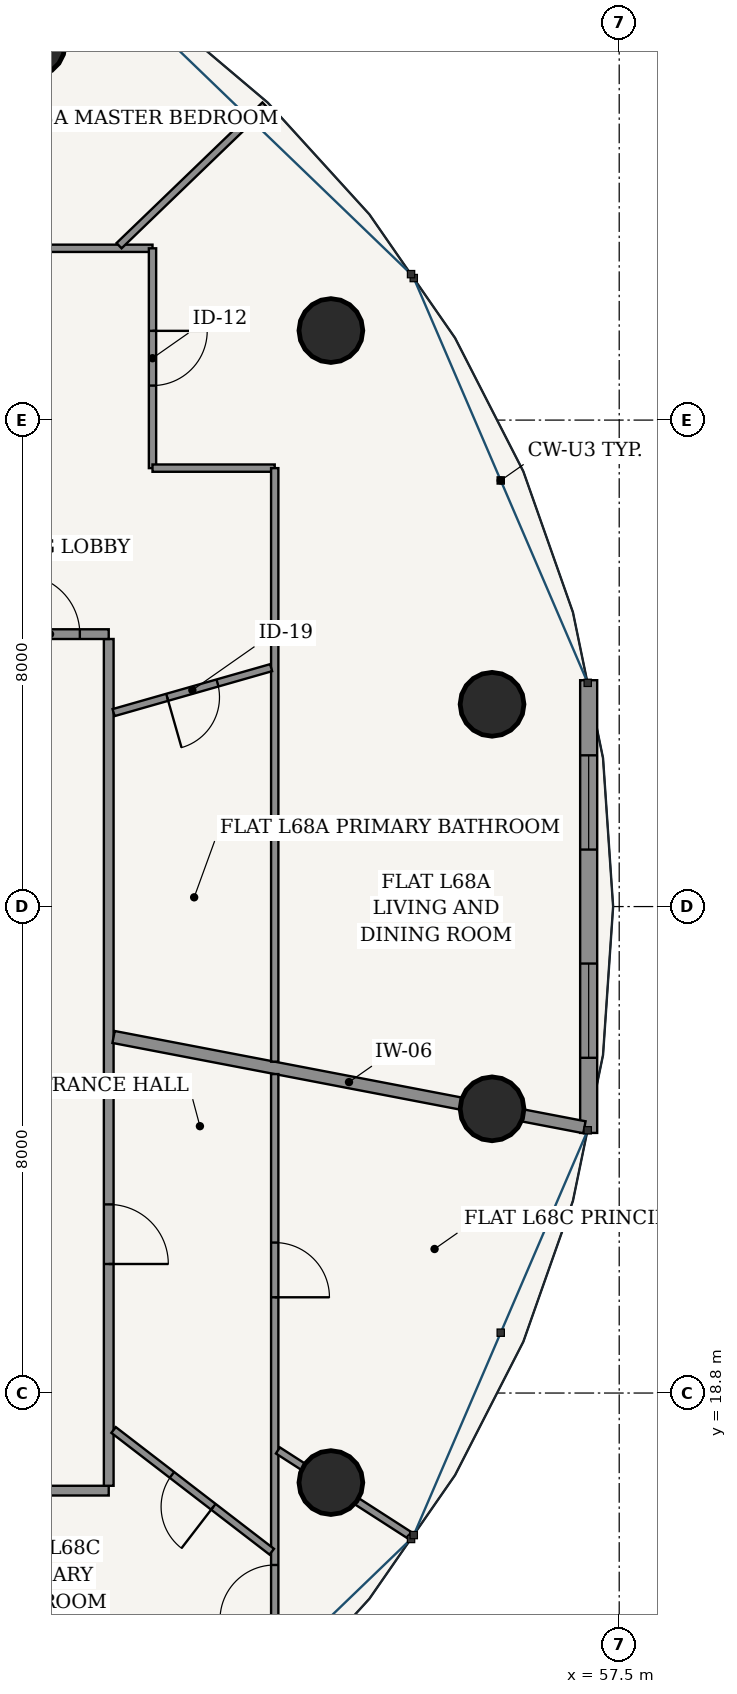
"""IFC4 building model, lengths in metres.
Left out: names, types, materials, properties, quantities, classifications, styles, units other than length and angle.
Written with IfcOpenShell. Run it as: python <this file> out.ifc"""

import sys

from ifc_helpers import new_model, si_unit, direction, frame, frame_2d, origin, origin_2d, place, context, subcontext, project, spatial, rectangle, hollow_circle, extrude, source, transform, mapped, element, fill, save


model = new_model("IFC4")
c1 = context("Model", 3, precision=1e-05, world=origin(), true_north=direction((-0.2419218956, 0.970295726276)))
c2 = subcontext(c1, "Body", "Model", "MODEL_VIEW")
j1 = project(units=[si_unit("LENGTHUNIT", "METRE"), si_unit("PLANEANGLEUNIT", "RADIAN")], contexts=[c1])
p1 = place(None, origin())
s1 = spatial("IfcSite", under=j1, at=p1, CompositionType="ELEMENT")
p2 = place(p1, origin())
s2 = spatial("IfcBuilding", under=s1, at=p2, CompositionType="ELEMENT")
p3 = place(p2, frame((0.0, 0.0, 259.45)))
s3 = spatial("IfcBuildingStorey", under=s2, at=p3, CompositionType="ELEMENT", Elevation=259.45)
for number, where, z_axis, x_axis in (
    (1, (55.409, 30.126, 0.0), (0.0, 0.0, 1.0), (1.0, 0.0, 0.0)),
    (2, (52.759, 36.272, 0.0), (0.0, 0.0, 1.0), (1.0, 0.0, 0.0)),
    (3, (47.861, 40.977, 0.0), (0.0, 0.0, 1.0), (1.0, 0.0, 0.0)),
    (4, (52.759, 17.328, 0.0), (0.0, 0.0, 1.0), (1.0, 0.0, 0.0)),
    (5, (55.409, 23.474, 0.0), (0.0, 0.0, 1.0), (1.0, 0.0, 0.0)),
):
    element("IfcColumn", number, at=place(p3, frame(where, z_axis=z_axis, x_axis=x_axis)), inside=s3, PredefinedType="COLUMN", context=c2, shape_type="SweptSolid", body=[
        extrude(hollow_circle(Radius=0.525, WallThickness=0.035, at=origin_2d()), origin(), (0.0, 0.0, 1.0), 3.75),
    ])
p4 = place(p3, frame((56.998, 23.078, 0.0), z_axis=(0.0, 0.0, 1.0), x_axis=(0.0, 1.0, 0.0)))
e6 = element("IfcWall", 6, at=p4, inside=s3, PredefinedType="SOLIDWALL", context=c2, shape_type="SweptSolid", body=[
    extrude(rectangle(XDim=7.445, YDim=0.28, at=frame_2d((3.722, 0.0))), origin(), (0.0, 0.0, 1.0), 3.49),
])
p5 = place(p4, frame((1.235, 0.0, 0.85)))
e7 = element("IfcOpeningElement", 7, at=p5, cuts=e6, PredefinedType="OPENING", context=c2, shape_type="SweptSolid", body=[
    extrude(rectangle(XDim=1.55, YDim=1.95, at=frame_2d((0.775, 0.975))), frame((0.0, 0.15, 0.0), z_axis=(0.0, -1.0, 0.0), x_axis=(1.0, 0.0, 0.0)), (0.0, 0.0, 1.0), 0.3),
])
p6 = place(p4, frame((4.66, 0.0, 0.85)))
e8 = element("IfcOpeningElement", 8, at=p6, cuts=e6, PredefinedType="OPENING", context=c2, shape_type="SweptSolid", body=[
    extrude(rectangle(XDim=1.55, YDim=1.95, at=frame_2d((0.775, 0.975))), frame((0.0, 0.15, 0.0), z_axis=(0.0, -1.0, 0.0), x_axis=(1.0, 0.0, 0.0)), (0.0, 0.0, 1.0), 0.3),
])
p7 = place(p3, frame((26.895, 17.195, 0.0), z_axis=(0.0, 0.0, 1.0), x_axis=(1.0, 0.0, 0.0)))
e9 = element("IfcWall", 9, at=p7, inside=s3, PredefinedType="PARTITIONING", context=c2, shape_type="SweptSolid", body=[
    extrude(rectangle(XDim=22.21, YDim=0.16, at=frame_2d((11.105, 0.0))), origin(), (0.0, 0.0, 1.0), 3.015),
])
p8 = place(p3, frame((49.105, 17.275, 0.0), z_axis=(0.0, 0.0, 1.0), x_axis=(0.0, 1.0, 0.0)))
e10 = element("IfcWall", 10, at=p8, inside=s3, PredefinedType="PARTITIONING", context=c2, shape_type="SweptSolid", body=[
    extrude(rectangle(XDim=13.925, YDim=0.16, at=frame_2d((6.962, 0.0))), origin(), (0.0, 0.0, 1.0), 3.015),
])
p9 = place(p8, frame((3.647, 0.0, 0.0)))
e11 = element("IfcOpeningElement", 11, at=p9, cuts=e10, PredefinedType="OPENING", context=c2, shape_type="SweptSolid", body=[
    extrude(rectangle(XDim=0.98, YDim=2.2, at=frame_2d((0.49, 1.1))), frame((0.0, 0.09, 0.0), z_axis=(0.0, -1.0, 0.0), x_axis=(1.0, 0.0, 0.0)), (0.0, 0.0, 1.0), 0.18),
])
p10 = place(p3, frame((47.175, 31.28, 0.0), z_axis=(0.0, 0.0, 1.0), x_axis=(1.0, 0.0, 0.0)))
e12 = element("IfcWall", 12, at=p10, inside=s3, PredefinedType="PARTITIONING", context=c2, shape_type="SweptSolid", body=[
    extrude(rectangle(XDim=1.93, YDim=0.16, at=frame_2d((0.965, 0.0))), origin(), (0.0, 0.0, 1.0), 3.49),
])
p11 = place(p10, frame((0.475, 0.0, 0.0)))
e13 = element("IfcOpeningElement", 13, at=p11, cuts=e12, PredefinedType="OPENING", context=c2, shape_type="SweptSolid", body=[
    extrude(rectangle(XDim=0.98, YDim=2.2, at=frame_2d((0.49, 1.1))), frame((0.0, 0.09, 0.0), z_axis=(0.0, -1.0, 0.0), x_axis=(1.0, 0.0, 0.0)), (0.0, 0.0, 1.0), 0.18),
])
p12 = place(p3, frame((49.185, 24.656, 0.0), z_axis=(0.0, 0.0, 1.0), x_axis=(0.982109889803, -0.188308694305, 0.0)))
e14 = element("IfcWall", 14, at=p12, inside=s3, PredefinedType="PARTITIONING", context=c2, shape_type="SweptSolid", body=[
    extrude(rectangle(XDim=7.884, YDim=0.2, at=frame_2d((3.942, 0.0))), origin(), (0.0, 0.0, 1.0), 3.015),
])
p13 = place(p3, frame((26.175, 37.625, 0.0), z_axis=(0.0, 0.0, 1.0), x_axis=(1.0, 0.0, 0.0)))
e15 = element("IfcWall", 15, at=p13, inside=s3, PredefinedType="PARTITIONING", context=c2, shape_type="SweptSolid", body=[
    extrude(rectangle(XDim=23.65, YDim=0.12, at=frame_2d((11.825, 0.0))), origin(), (0.0, 0.0, 1.0), 3.015),
])
p14 = place(p13, frame((14.733, 0.0, 0.0)))
e16 = element("IfcOpeningElement", 16, at=p14, cuts=e15, PredefinedType="OPENING", context=c2, shape_type="SweptSolid", body=[
    extrude(rectangle(XDim=0.9, YDim=2.15, at=frame_2d((0.45, 1.075))), frame((0.0, 0.07, 0.0), z_axis=(0.0, -1.0, 0.0), x_axis=(1.0, 0.0, 0.0)), (0.0, 0.0, 1.0), 0.14),
])
p15 = place(p13, frame((11.279, 0.0, 0.0)))
e17 = element("IfcOpeningElement", 17, at=p15, cuts=e15, PredefinedType="OPENING", context=c2, shape_type="SweptSolid", body=[
    extrude(rectangle(XDim=0.9, YDim=2.15, at=frame_2d((0.45, 1.075))), frame((0.0, 0.07, 0.0), z_axis=(0.0, -1.0, 0.0), x_axis=(1.0, 0.0, 0.0)), (0.0, 0.0, 1.0), 0.14),
])
p16 = place(p13, frame((2.678, 0.0, 0.0)))
e18 = element("IfcOpeningElement", 18, at=p16, cuts=e15, PredefinedType="OPENING", context=c2, shape_type="SweptSolid", body=[
    extrude(rectangle(XDim=0.9, YDim=2.15, at=frame_2d((0.45, 1.075))), frame((0.0, 0.07, 0.0), z_axis=(0.0, -1.0, 0.0), x_axis=(1.0, 0.0, 0.0)), (0.0, 0.0, 1.0), 0.14),
])
p17 = place(p3, frame((49.825, 37.625, 0.0), z_axis=(0.0, 0.0, 1.0), x_axis=(0.0, -1.0, 0.0)))
e19 = element("IfcWall", 19, at=p17, inside=s3, PredefinedType="PARTITIONING", context=c2, shape_type="SweptSolid", body=[
    extrude(rectangle(XDim=3.615, YDim=0.12, at=frame_2d((1.808, 0.0))), origin(), (0.0, 0.0, 1.0), 3.015),
])
p18 = place(p17, frame((1.357, 0.0, 0.0)))
e20 = element("IfcOpeningElement", 20, at=p18, cuts=e19, PredefinedType="OPENING", context=c2, shape_type="SweptSolid", body=[
    extrude(rectangle(XDim=0.9, YDim=2.15, at=frame_2d((0.45, 1.075))), frame((0.0, 0.07, 0.0), z_axis=(0.0, -1.0, 0.0), x_axis=(1.0, 0.0, 0.0)), (0.0, 0.0, 1.0), 0.14),
])
p19 = place(p3, frame((49.825, 34.01, 0.0), z_axis=(0.0, 0.0, 1.0), x_axis=(1.0, 0.0, 0.0)))
e21 = element("IfcWall", 21, at=p19, inside=s3, PredefinedType="PARTITIONING", context=c2, shape_type="SweptSolid", body=[
    extrude(rectangle(XDim=2.01, YDim=0.12, at=frame_2d((1.005, 0.0))), origin(), (0.0, 0.0, 1.0), 3.209),
])
p20 = place(p3, frame((51.835, 34.01, 0.0), z_axis=(0.0, 0.0, 1.0), x_axis=(0.0, -1.0, 0.0)))
e22 = element("IfcWall", 22, at=p20, inside=s3, PredefinedType="PARTITIONING", context=c2, shape_type="SweptSolid", body=[
    extrude(rectangle(XDim=9.761, YDim=0.12, at=frame_2d((4.88, 0.0))), origin(), (0.0, 0.0, 1.0), 3.015),
])
p21 = place(p3, frame((49.275, 37.668, 0.0), z_axis=(0.0, 0.0, 1.0), x_axis=(0.719954096891, 0.694021684366, 0.0)))
e23 = element("IfcWall", 23, at=p21, inside=s3, PredefinedType="PARTITIONING", context=c2, shape_type="SweptSolid", body=[
    extrude(rectangle(XDim=3.333, YDim=0.12, at=frame_2d((1.667, 0.0))), origin(), (0.0, 0.0, 1.0), 3.121),
])
p22 = place(p3, frame((49.185, 29.99, 0.0), z_axis=(0.0, 0.0, 1.0), x_axis=(0.961653809431, 0.274266204273, 0.0)))
e24 = element("IfcWall", 24, at=p22, inside=s3, PredefinedType="PARTITIONING", context=c2, shape_type="SweptSolid", body=[
    extrude(rectangle(XDim=2.694, YDim=0.12, at=frame_2d((1.347, 0.0))), origin(), (0.0, 0.0, 1.0), 3.209),
])
p23 = place(p22, frame((0.917, 0.0, 0.0)))
e25 = element("IfcOpeningElement", 25, at=p23, cuts=e24, PredefinedType="OPENING", context=c2, shape_type="SweptSolid", body=[
    extrude(rectangle(XDim=0.86, YDim=2.15, at=frame_2d((0.43, 1.075))), frame((0.0, 0.07, 0.0), z_axis=(0.0, -1.0, 0.0), x_axis=(1.0, 0.0, 0.0)), (0.0, 0.0, 1.0), 0.14),
])
p24 = place(p3, frame((51.835, 24.045, 0.0), z_axis=(0.0, 0.0, 1.0), x_axis=(0.0, -1.0, 0.0)))
e26 = element("IfcWall", 26, at=p24, inside=s3, PredefinedType="PARTITIONING", context=c2, shape_type="SweptSolid", body=[
    extrude(rectangle(XDim=9.58, YDim=0.12, at=frame_2d((4.79, 0.0))), origin(), (0.0, 0.0, 1.0), 3.015),
])
p25 = place(p24, frame((2.771, 0.0, 0.0)))
e27 = element("IfcOpeningElement", 27, at=p25, cuts=e26, PredefinedType="OPENING", context=c2, shape_type="SweptSolid", body=[
    extrude(rectangle(XDim=0.9, YDim=2.15, at=frame_2d((0.45, 1.075))), frame((0.0, 0.07, 0.0), z_axis=(0.0, -1.0, 0.0), x_axis=(1.0, 0.0, 0.0)), (0.0, 0.0, 1.0), 0.14),
])
p26 = place(p24, frame((8.073, 0.0, 0.0)))
e28 = element("IfcOpeningElement", 28, at=p26, cuts=e26, PredefinedType="OPENING", context=c2, shape_type="SweptSolid", body=[
    extrude(rectangle(XDim=0.9, YDim=2.15, at=frame_2d((0.45, 1.075))), frame((0.0, 0.07, 0.0), z_axis=(0.0, -1.0, 0.0), x_axis=(1.0, 0.0, 0.0)), (0.0, 0.0, 1.0), 0.14),
])
p27 = place(p3, frame((51.887, 17.856, 0.0), z_axis=(0.0, 0.0, 1.0), x_axis=(0.840708587197, -0.54148783127, 0.0)))
e29 = element("IfcWall", 29, at=p27, inside=s3, PredefinedType="PARTITIONING", context=c2, shape_type="SweptSolid", body=[
    extrude(rectangle(XDim=2.568, YDim=0.12, at=frame_2d((1.284, 0.0))), origin(), (0.0, 0.0, 1.0), 3.015),
])
p28 = place(p3, frame((49.185, 18.192, 0.0), z_axis=(0.0, 0.0, 1.0), x_axis=(0.792502290575, -0.609868936275, 0.0)))
e30 = element("IfcWall", 30, at=p28, inside=s3, PredefinedType="PARTITIONING", context=c2, shape_type="SweptSolid", body=[
    extrude(rectangle(XDim=3.282, YDim=0.12, at=frame_2d((1.641, 0.0))), origin(), (0.0, 0.0, 1.0), 3.121),
])
p29 = place(p28, frame((1.211, 0.0, 0.0)))
e31 = element("IfcOpeningElement", 31, at=p29, cuts=e30, PredefinedType="OPENING", context=c2, shape_type="SweptSolid", body=[
    extrude(rectangle(XDim=0.86, YDim=2.15, at=frame_2d((0.43, 1.075))), frame((0.0, 0.07, 0.0), z_axis=(0.0, -1.0, 0.0), x_axis=(1.0, 0.0, 0.0)), (0.0, 0.0, 1.0), 0.14),
])
m1 = source(origin(), c2, "Body", "SweptSolid", [
    extrude(rectangle(XDim=1.55, YDim=1.95, at=frame_2d((0.775, 0.975))), frame((0.0, 0.03, 0.0), z_axis=(0.0, -1.0, 0.0), x_axis=(1.0, 0.0, 0.0)), (0.0, 0.0, 1.0), 0.06),
])
p30 = place(p5, origin())
e32 = element("IfcWindow", 32, at=p30, inside=s3, PartitioningType="SINGLE_PANEL", PredefinedType="WINDOW", context=c2, shape_type="MappedRepresentation", body=[
    mapped(m1, transform((0.0, 0.0, 0.0), scale=1.0)),
])
fill(e7, e32)
p31 = place(p6, origin())
e33 = element("IfcWindow", 33, at=p31, inside=s3, PartitioningType="SINGLE_PANEL", PredefinedType="WINDOW", context=c2, shape_type="MappedRepresentation", body=[
    mapped(m1, transform((0.0, 0.0, 0.0), scale=1.0)),
])
fill(e8, e33)
m2 = source(origin(), c2, "Body", "SweptSolid", [
    extrude(rectangle(XDim=0.98, YDim=2.2, at=frame_2d((0.49, 1.1))), frame((0.0, 0.025, 0.0), z_axis=(0.0, -1.0, 0.0), x_axis=(1.0, 0.0, 0.0)), (0.0, 0.0, 1.0), 0.05),
])
p32 = place(p11, origin())
e34 = element("IfcDoor", 34, at=p32, inside=s3, OperationType="SINGLE_SWING_LEFT", PredefinedType="DOOR", context=c2, shape_type="MappedRepresentation", body=[
    mapped(m2, transform((0.0, 0.0, 0.0), scale=1.0)),
])
fill(e13, e34)
m3 = source(origin(), c2, "Body", "SweptSolid", [
    extrude(rectangle(XDim=0.86, YDim=2.15, at=frame_2d((0.43, 1.075))), frame((0.0, 0.025, 0.0), z_axis=(0.0, -1.0, 0.0), x_axis=(1.0, 0.0, 0.0)), (0.0, 0.0, 1.0), 0.05),
])
p33 = place(p23, frame((0.86, 0.0, 0.0), z_axis=(0.0, 0.0, 1.0), x_axis=(-1.0, 0.0, 0.0)))
e35 = element("IfcDoor", 35, at=p33, inside=s3, OperationType="SINGLE_SWING_RIGHT", PredefinedType="DOOR", context=c2, shape_type="MappedRepresentation", body=[
    mapped(m3, transform((0.0, 0.0, 0.0), scale=1.0)),
])
fill(e25, e35)
m4 = source(origin(), c2, "Body", "SweptSolid", [
    extrude(rectangle(XDim=0.9, YDim=2.15, at=frame_2d((0.45, 1.075))), frame((0.0, 0.025, 0.0), z_axis=(0.0, -1.0, 0.0), x_axis=(1.0, 0.0, 0.0)), (0.0, 0.0, 1.0), 0.05),
])
p34 = place(p18, origin())
e36 = element("IfcDoor", 36, at=p34, inside=s3, OperationType="SINGLE_SWING_LEFT", PredefinedType="DOOR", context=c2, shape_type="MappedRepresentation", body=[
    mapped(m4, transform((0.0, 0.0, 0.0), scale=1.0)),
])
fill(e20, e36)
p35 = place(p9, frame((0.98, 0.0, 0.0), z_axis=(0.0, 0.0, 1.0), x_axis=(-1.0, 0.0, 0.0)))
e37 = element("IfcDoor", 37, at=p35, inside=s3, OperationType="SINGLE_SWING_RIGHT", PredefinedType="DOOR", context=c2, shape_type="MappedRepresentation", body=[
    mapped(m2, transform((0.0, 0.0, 0.0), scale=1.0)),
])
fill(e11, e37)
p36 = place(p29, frame((0.86, 0.0, 0.0), z_axis=(0.0, 0.0, 1.0), x_axis=(-1.0, 0.0, 0.0)))
e38 = element("IfcDoor", 38, at=p36, inside=s3, OperationType="SINGLE_SWING_LEFT", PredefinedType="DOOR", context=c2, shape_type="MappedRepresentation", body=[
    mapped(m3, transform((0.0, 0.0, 0.0), scale=1.0)),
])
fill(e31, e38)
p37 = place(p25, origin())
e39 = element("IfcDoor", 39, at=p37, inside=s3, OperationType="SINGLE_SWING_RIGHT", PredefinedType="DOOR", context=c2, shape_type="MappedRepresentation", body=[
    mapped(m4, transform((0.0, 0.0, 0.0), scale=1.0)),
])
fill(e27, e39)
p38 = place(p26, frame((0.9, 0.0, 0.0), z_axis=(0.0, 0.0, 1.0), x_axis=(-1.0, 0.0, 0.0)))
e40 = element("IfcDoor", 40, at=p38, inside=s3, OperationType="SINGLE_SWING_LEFT", PredefinedType="DOOR", context=c2, shape_type="MappedRepresentation", body=[
    mapped(m4, transform((0.0, 0.0, 0.0), scale=1.0)),
])
fill(e28, e40)
save(model, sys.argv[1])
